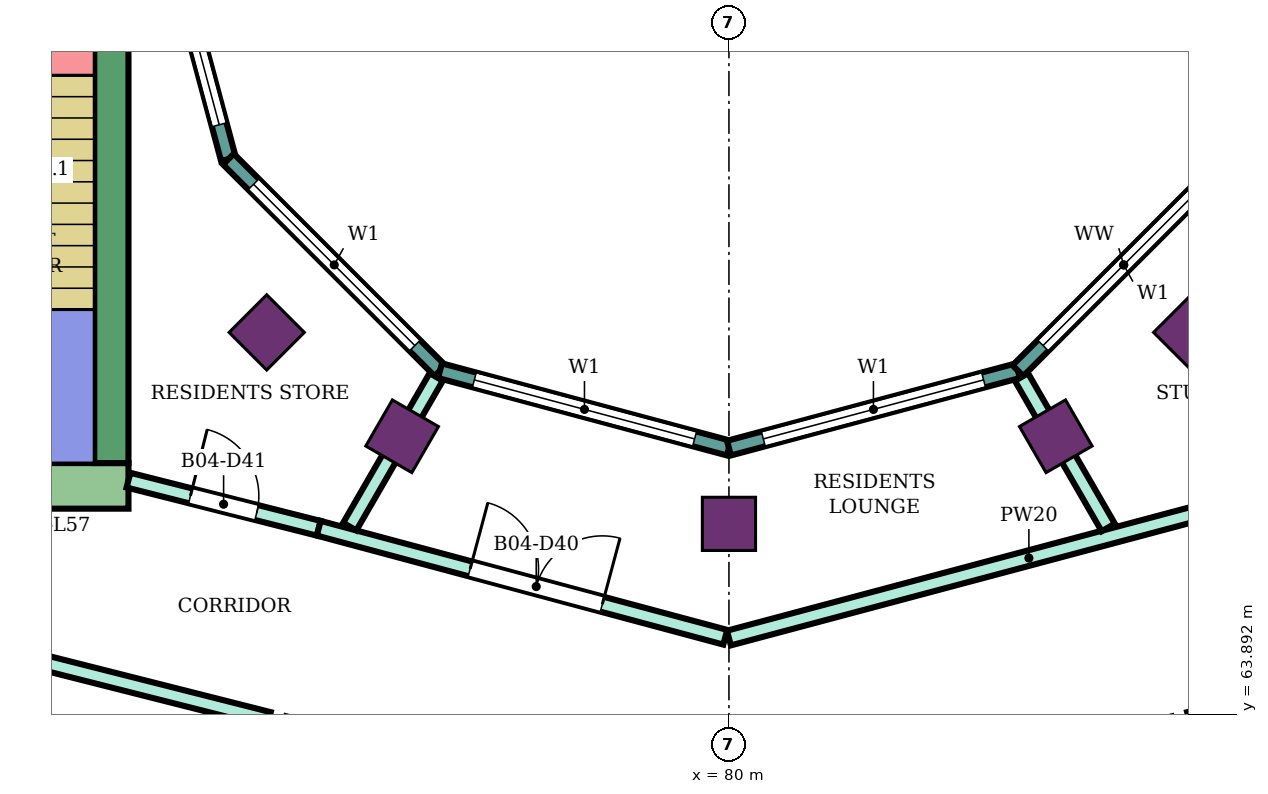
"""IFC4 building model, lengths in metres.
Left out: names, types, materials, properties, quantities, classifications, styles, units other than length and angle.
Written with IfcOpenShell. Run it as: python <this file> out.ifc"""

import sys

from ifc_helpers import new_model, si_unit, direction, frame, frame_2d, origin, origin_2d, place, context, subcontext, project, spatial, rectangle, extrude, element, fill, save


model = new_model("IFC4")
c1 = context("Model", 3, precision=1e-05, world=origin(), true_north=direction((0.0, 1.0)))
c2 = subcontext(c1, "Body", "Model", "MODEL_VIEW")
j1 = project(units=[si_unit("LENGTHUNIT", "METRE"), si_unit("PLANEANGLEUNIT", "RADIAN")], contexts=[c1])
p1 = place(None, origin())
s1 = spatial("IfcSite", under=j1, at=p1, CompositionType="ELEMENT")
p2 = place(p1, origin())
s2 = spatial("IfcBuilding", under=s1, at=p2, CompositionType="ELEMENT")
p3 = place(p2, frame((0.0, 0.0, 249.9)))
s3 = spatial("IfcBuildingStorey", under=s2, at=p3, CompositionType="ELEMENT", Elevation=249.9)
for number, where, z_axis, x_axis in (
    (1, (73.919, 68.919, 0.0), (0.0, 0.0, 1.0), (-0.707, -0.707, 0.0)),
    (2, (75.7, 67.552, 0.0), (0.0, 0.0, 1.0), (-0.5, -0.866, 0.0)),
    (3, (80.0, 66.4, 0.0), (0.0, 0.0, 1.0), (0.0, -1.0, 0.0)),
    (4, (84.3, 67.552, 0.0), (0.0, 0.0, 1.0), (0.5, -0.866, 0.0)),
    (5, (86.081, 68.919, 0.0), (0.0, 0.0, 1.0), (0.707, -0.707, 0.0)),
):
    element("IfcColumn", number, at=place(p3, frame(where, z_axis=z_axis, x_axis=x_axis)), inside=s3, PredefinedType="COLUMN", context=c2, shape_type="SweptSolid", body=[
        extrude(rectangle(XDim=0.7, YDim=0.7, at=origin_2d()), origin(), (0.0, 0.0, 1.0), 4.2),
    ])
p4 = place(p3, frame((72.1, 66.9, 0.0), z_axis=(0.0, 0.0, 1.0), x_axis=(-1.0, 0.0, 0.0)))
e6 = element("IfcWall", 6, at=p4, inside=s3, PredefinedType="SHEAR", context=c2, shape_type="SweptSolid", body=[
    extrude(rectangle(XDim=14.9, YDim=0.6, at=frame_2d((7.45, 0.0))), origin(), (0.0, 0.0, 1.0), 3.88),
])
p5 = place(p4, frame((4.2, 0.0, 0.0)))
e7 = element("IfcOpeningElement", 7, at=p5, cuts=e6, PredefinedType="OPENING", context=c2, shape_type="SweptSolid", body=[
    extrude(rectangle(XDim=2.4, YDim=2.4, at=frame_2d((1.2, 1.2))), frame((0.0, 0.31, 0.0), z_axis=(0.0, -1.0, 0.0), x_axis=(1.0, 0.0, 0.0)), (0.0, 0.0, 1.0), 0.62),
])
p6 = place(p3, frame((71.875, 75.0, 0.0), z_axis=(0.0, 0.0, 1.0), x_axis=(0.0, -1.0, 0.0)))
e8 = element("IfcWall", 8, at=p6, inside=s3, PredefinedType="SHEAR", context=c2, shape_type="SweptSolid", body=[
    extrude(rectangle(XDim=7.8, YDim=0.45, at=frame_2d((3.9, 0.0))), origin(), (0.0, 0.0, 1.0), 3.88),
])
p7 = place(p3, frame((72.396, 75.0, 0.0), z_axis=(0.0, 0.0, 1.0), x_axis=(0.258789828301, -0.965933654434, 0.0)))
e9 = element("IfcWall", 9, at=p7, inside=s3, PredefinedType="NOTDEFINED", context=c2, shape_type="SweptSolid", body=[
    extrude(rectangle(XDim=3.936, YDim=0.2, at=frame_2d((1.968, 0.0))), origin(), (0.0, 0.0, 1.0), 4.2),
])
p8 = place(p7, frame((0.468, 0.0, 0.9)))
e10 = element("IfcOpeningElement", 10, at=p8, cuts=e9, PredefinedType="OPENING", context=c2, shape_type="SweptSolid", body=[
    extrude(rectangle(XDim=3.0, YDim=2.3, at=frame_2d((1.5, 1.15))), frame((0.0, 0.11, 0.0), z_axis=(0.0, -1.0, 0.0), x_axis=(1.0, 0.0, 0.0)), (0.0, 0.0, 1.0), 0.22),
])
p9 = place(p3, frame((73.415, 71.198, 0.0), z_axis=(0.0, 0.0, 1.0), x_axis=(0.707106781187, -0.707106781187, 0.0)))
e11 = element("IfcWall", 11, at=p9, inside=s3, PredefinedType="NOTDEFINED", context=c2, shape_type="SweptSolid", body=[
    extrude(rectangle(XDim=3.936, YDim=0.2, at=frame_2d((1.968, 0.0))), origin(), (0.0, 0.0, 1.0), 4.2),
])
p10 = place(p9, frame((0.468, 0.0, 0.9)))
e12 = element("IfcOpeningElement", 12, at=p10, cuts=e11, PredefinedType="OPENING", context=c2, shape_type="SweptSolid", body=[
    extrude(rectangle(XDim=3.0, YDim=2.3, at=frame_2d((1.5, 1.15))), frame((0.0, 0.11, 0.0), z_axis=(0.0, -1.0, 0.0), x_axis=(1.0, 0.0, 0.0)), (0.0, 0.0, 1.0), 0.22),
])
p11 = place(p3, frame((76.198, 68.415, 0.0), z_axis=(0.0, 0.0, 1.0), x_axis=(0.965933654434, -0.258789828301, 0.0)))
e13 = element("IfcWall", 13, at=p11, inside=s3, PredefinedType="NOTDEFINED", context=c2, shape_type="SweptSolid", body=[
    extrude(rectangle(XDim=3.936, YDim=0.2, at=frame_2d((1.968, 0.0))), origin(), (0.0, 0.0, 1.0), 4.2),
])
p12 = place(p11, frame((0.468, 0.0, 0.9)))
e14 = element("IfcOpeningElement", 14, at=p12, cuts=e13, PredefinedType="OPENING", context=c2, shape_type="SweptSolid", body=[
    extrude(rectangle(XDim=3.0, YDim=2.3, at=frame_2d((1.5, 1.15))), frame((0.0, 0.11, 0.0), z_axis=(0.0, -1.0, 0.0), x_axis=(1.0, 0.0, 0.0)), (0.0, 0.0, 1.0), 0.22),
])
p13 = place(p3, frame((80.0, 67.396, 0.0), z_axis=(0.0, 0.0, 1.0), x_axis=(0.965933654434, 0.258789828301, 0.0)))
e15 = element("IfcWall", 15, at=p13, inside=s3, PredefinedType="NOTDEFINED", context=c2, shape_type="SweptSolid", body=[
    extrude(rectangle(XDim=3.936, YDim=0.2, at=frame_2d((1.968, 0.0))), origin(), (0.0, 0.0, 1.0), 4.2),
])
p14 = place(p13, frame((0.468, 0.0, 0.9)))
e16 = element("IfcOpeningElement", 16, at=p14, cuts=e15, PredefinedType="OPENING", context=c2, shape_type="SweptSolid", body=[
    extrude(rectangle(XDim=3.0, YDim=2.3, at=frame_2d((1.5, 1.15))), frame((0.0, 0.11, 0.0), z_axis=(0.0, -1.0, 0.0), x_axis=(1.0, 0.0, 0.0)), (0.0, 0.0, 1.0), 0.22),
])
p15 = place(p3, frame((83.802, 68.415, 0.0), z_axis=(0.0, 0.0, 1.0), x_axis=(0.707106781187, 0.707106781187, 0.0)))
e17 = element("IfcWall", 17, at=p15, inside=s3, PredefinedType="NOTDEFINED", context=c2, shape_type="SweptSolid", body=[
    extrude(rectangle(XDim=3.936, YDim=0.2, at=frame_2d((1.968, 0.0))), origin(), (0.0, 0.0, 1.0), 4.2),
])
p16 = place(p15, frame((0.468, 0.0, 0.9)))
e18 = element("IfcOpeningElement", 18, at=p16, cuts=e17, PredefinedType="OPENING", context=c2, shape_type="SweptSolid", body=[
    extrude(rectangle(XDim=3.0, YDim=2.3, at=frame_2d((1.5, 1.15))), frame((0.0, 0.11, 0.0), z_axis=(0.0, -1.0, 0.0), x_axis=(1.0, 0.0, 0.0)), (0.0, 0.0, 1.0), 0.22),
])
p17 = place(p3, frame((68.2, 65.28, 0.0), z_axis=(0.0, 0.0, 1.0), x_axis=(0.969450596516, -0.245286650503, 0.0)))
e19 = element("IfcWall", 19, at=p17, inside=s3, PredefinedType="PARTITIONING", context=c2, shape_type="SweptSolid", body=[
    extrude(rectangle(XDim=5.928, YDim=0.2, at=frame_2d((2.964, 0.0))), origin(), (0.0, 0.0, 1.0), 3.75),
])
p18 = place(p3, frame((72.1, 66.975, 0.0), z_axis=(0.0, 0.0, 1.0), x_axis=(0.969471314457, -0.245204752086, 0.0)))
e20 = element("IfcWall", 20, at=p18, inside=s3, PredefinedType="PARTITIONING", context=c2, shape_type="SweptSolid", body=[
    extrude(rectangle(XDim=2.582, YDim=0.2, at=frame_2d((1.291, 0.0))), origin(), (0.0, 0.0, 1.0), 3.75),
])
p19 = place(p18, frame((0.841, 0.0, 0.0)))
e21 = element("IfcOpeningElement", 21, at=p19, cuts=e20, PredefinedType="OPENING", context=c2, shape_type="SweptSolid", body=[
    extrude(rectangle(XDim=0.9, YDim=2.1, at=frame_2d((0.45, 1.05))), frame((0.0, 0.11, 0.0), z_axis=(0.0, -1.0, 0.0), x_axis=(1.0, 0.0, 0.0)), (0.0, 0.0, 1.0), 0.22),
])
p20 = place(p3, frame((74.603, 66.342, 0.0), z_axis=(0.0, 0.0, 1.0), x_axis=(0.965895298152, -0.258932950796, 0.0)))
e22 = element("IfcWall", 22, at=p20, inside=s3, PredefinedType="PARTITIONING", context=c2, shape_type="SweptSolid", body=[
    extrude(rectangle(XDim=5.538, YDim=0.2, at=frame_2d((2.769, 0.0))), origin(), (0.0, 0.0, 1.0), 3.75),
])
p21 = place(p20, frame((2.062, 0.0, 0.0)))
e23 = element("IfcOpeningElement", 23, at=p21, cuts=e22, PredefinedType="OPENING", context=c2, shape_type="SweptSolid", body=[
    extrude(rectangle(XDim=1.8, YDim=2.1, at=frame_2d((0.9, 1.05))), frame((0.0, 0.11, 0.0), z_axis=(0.0, -1.0, 0.0), x_axis=(1.0, 0.0, 0.0)), (0.0, 0.0, 1.0), 0.22),
])
p22 = place(p3, frame((75.011, 66.364, 0.0), z_axis=(0.0, 0.0, 1.0), x_axis=(0.500121996664, 0.86595495752, 0.0)))
e24 = element("IfcWall", 24, at=p22, inside=s3, PredefinedType="PARTITIONING", context=c2, shape_type="SweptSolid", body=[
    extrude(rectangle(XDim=2.274, YDim=0.2, at=frame_2d((1.137, 0.0))), origin(), (0.0, 0.0, 1.0), 3.75),
])
p23 = place(p3, frame((80.0, 64.898, 0.0), z_axis=(0.0, 0.0, 1.0), x_axis=(0.966237419782, 0.257653349704, 0.0)))
e25 = element("IfcWall", 25, at=p23, inside=s3, PredefinedType="PARTITIONING", context=c2, shape_type="SweptSolid", body=[
    extrude(rectangle(XDim=8.169, YDim=0.2, at=frame_2d((4.084, 0.0))), origin(), (0.0, 0.0, 1.0), 3.75),
])
p24 = place(p23, frame((6.428, 0.0, 0.0)))
e26 = element("IfcOpeningElement", 26, at=p24, cuts=e25, PredefinedType="OPENING", context=c2, shape_type="SweptSolid", body=[
    extrude(rectangle(XDim=0.9, YDim=2.1, at=frame_2d((0.45, 1.05))), frame((0.0, 0.11, 0.0), z_axis=(0.0, -1.0, 0.0), x_axis=(1.0, 0.0, 0.0)), (0.0, 0.0, 1.0), 0.22),
])
p25 = place(p3, frame((83.848, 68.331, 0.0), z_axis=(0.0, 0.0, 1.0), x_axis=(0.499851978358, -0.866110847255, 0.0)))
e27 = element("IfcWall", 27, at=p25, inside=s3, PredefinedType="PARTITIONING", context=c2, shape_type="SweptSolid", body=[
    extrude(rectangle(XDim=2.284, YDim=0.2, at=frame_2d((1.142, 0.0))), origin(), (0.0, 0.0, 1.0), 3.75),
])
p26 = place(p3, frame((86.053, 63.826, 0.0), z_axis=(0.0, 0.0, 1.0), x_axis=(0.969490004987, 0.245130843083, 0.0)))
e28 = element("IfcWall", 28, at=p26, inside=s3, PredefinedType="PARTITIONING", context=c2, shape_type="SweptSolid", body=[
    extrude(rectangle(XDim=5.908, YDim=0.2, at=frame_2d((2.954, 0.0))), origin(), (0.0, 0.0, 1.0), 3.75),
])
p27 = place(p8, origin())
e29 = element("IfcWindow", 29, at=p27, inside=s3, PartitioningType="SINGLE_PANEL", PredefinedType="WINDOW", context=c2, shape_type="SweptSolid", body=[
    extrude(rectangle(XDim=3.0, YDim=2.3, at=frame_2d((1.5, 1.15))), frame((0.0, 0.03, 0.0), z_axis=(0.0, -1.0, 0.0), x_axis=(1.0, 0.0, 0.0)), (0.0, 0.0, 1.0), 0.06),
])
fill(e10, e29)
p28 = place(p10, origin())
e30 = element("IfcWindow", 30, at=p28, inside=s3, PartitioningType="SINGLE_PANEL", PredefinedType="WINDOW", context=c2, shape_type="SweptSolid", body=[
    extrude(rectangle(XDim=3.0, YDim=2.3, at=frame_2d((1.5, 1.15))), frame((0.0, 0.03, 0.0), z_axis=(0.0, -1.0, 0.0), x_axis=(1.0, 0.0, 0.0)), (0.0, 0.0, 1.0), 0.06),
])
fill(e12, e30)
p29 = place(p12, origin())
e31 = element("IfcWindow", 31, at=p29, inside=s3, PartitioningType="SINGLE_PANEL", PredefinedType="WINDOW", context=c2, shape_type="SweptSolid", body=[
    extrude(rectangle(XDim=3.0, YDim=2.3, at=frame_2d((1.5, 1.15))), frame((0.0, 0.03, 0.0), z_axis=(0.0, -1.0, 0.0), x_axis=(1.0, 0.0, 0.0)), (0.0, 0.0, 1.0), 0.06),
])
fill(e14, e31)
p30 = place(p14, origin())
e32 = element("IfcWindow", 32, at=p30, inside=s3, PartitioningType="SINGLE_PANEL", PredefinedType="WINDOW", context=c2, shape_type="SweptSolid", body=[
    extrude(rectangle(XDim=3.0, YDim=2.3, at=frame_2d((1.5, 1.15))), frame((0.0, 0.03, 0.0), z_axis=(0.0, -1.0, 0.0), x_axis=(1.0, 0.0, 0.0)), (0.0, 0.0, 1.0), 0.06),
])
fill(e16, e32)
p31 = place(p16, origin())
e33 = element("IfcWindow", 33, at=p31, inside=s3, PartitioningType="SINGLE_PANEL", PredefinedType="WINDOW", context=c2, shape_type="SweptSolid", body=[
    extrude(rectangle(XDim=3.0, YDim=2.3, at=frame_2d((1.5, 1.15))), frame((0.0, 0.03, 0.0), z_axis=(0.0, -1.0, 0.0), x_axis=(1.0, 0.0, 0.0)), (0.0, 0.0, 1.0), 0.06),
])
fill(e18, e33)
p32 = place(p21, origin())
e34 = element("IfcDoor", 34, at=p32, inside=s3, OperationType="DOUBLE_DOOR_SINGLE_SWING", PredefinedType="DOOR", context=c2, shape_type="SweptSolid", body=[
    extrude(rectangle(XDim=1.8, YDim=2.1, at=frame_2d((0.9, 1.05))), frame((0.0, 0.025, 0.0), z_axis=(0.0, -1.0, 0.0), x_axis=(1.0, 0.0, 0.0)), (0.0, 0.0, 1.0), 0.05),
])
fill(e23, e34)
p33 = place(p19, origin())
e35 = element("IfcDoor", 35, at=p33, inside=s3, OperationType="SINGLE_SWING_LEFT", PredefinedType="DOOR", context=c2, shape_type="SweptSolid", body=[
    extrude(rectangle(XDim=0.9, YDim=2.1, at=frame_2d((0.45, 1.05))), frame((0.0, 0.025, 0.0), z_axis=(0.0, -1.0, 0.0), x_axis=(1.0, 0.0, 0.0)), (0.0, 0.0, 1.0), 0.05),
])
fill(e21, e35)
save(model, sys.argv[1])
